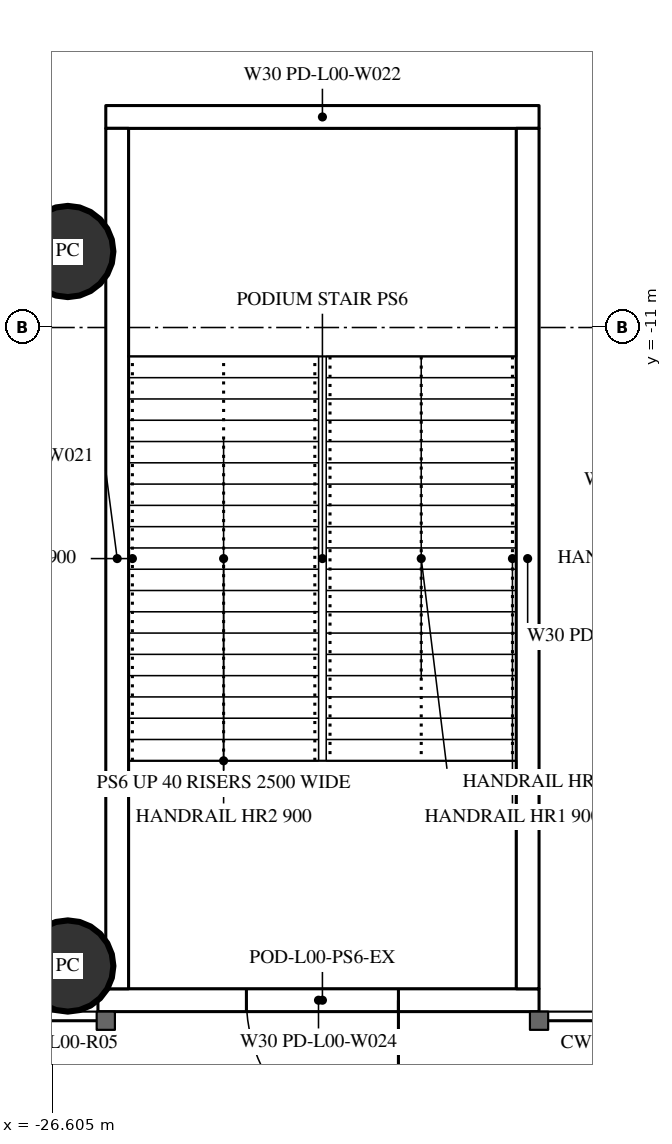
"""IFC4 building model, lengths in metres.
Left out: names, types, materials, properties, quantities, classifications, styles, units other than length and angle.
Written with IfcOpenShell. Run it as: python <this file> out.ifc"""

import sys

from ifc_helpers import new_model, si_unit, direction, frame, frame_2d, origin, origin_2d, place, context, subcontext, project, spatial, rectangle, circle, extrude, element, fill, save


model = new_model("IFC4")
c1 = context("Model", 3, precision=1e-05, world=origin(), true_north=direction((0.0, 1.0)))
c2 = subcontext(c1, "Body", "Model", "MODEL_VIEW")
j1 = project(units=[si_unit("LENGTHUNIT", "METRE"), si_unit("PLANEANGLEUNIT", "RADIAN")], contexts=[c1])
p1 = place(None, origin())
s1 = spatial("IfcSite", under=j1, at=p1, CompositionType="ELEMENT")
p2 = place(p1, origin())
s2 = spatial("IfcBuilding", under=s1, at=p2, CompositionType="ELEMENT")
p3 = place(p2, origin())
s3 = spatial("IfcBuildingStorey", under=s2, at=p3, CompositionType="ELEMENT", Elevation=0.0)
for number, where, z_axis, x_axis in (
    (1, (-26.4, -19.4, 0.0), (0.0, 0.0, 1.0), (1.0, 0.0, 0.0)),
    (2, (-26.4, -10.0, 0.0), (0.0, 0.0, 1.0), (1.0, 0.0, 0.0)),
):
    element("IfcColumn", number, at=place(p3, frame(where, z_axis=z_axis, x_axis=x_axis)), inside=s3, PredefinedType="COLUMN", context=c2, shape_type="SweptSolid", body=[
        extrude(circle(Radius=0.6, at=origin_2d()), origin(), (0.0, 0.0, 1.0), 7.2),
    ])
p4 = place(p3, frame((-20.2, -19.85, 0.0), z_axis=(0.0, 0.0, 1.0), x_axis=(-1.0, 0.0, 0.0)))
e3 = element("IfcWall", 3, at=p4, inside=s3, PredefinedType="SOLIDWALL", context=c2, shape_type="SweptSolid", body=[
    extrude(rectangle(XDim=5.803, YDim=0.3, at=frame_2d((2.902, 0.0))), origin(), (0.0, 0.0, 1.0), 5.95),
])
p5 = place(p4, frame((1.85, 0.0, 0.0)))
e4 = element("IfcOpeningElement", 4, at=p5, cuts=e3, PredefinedType="OPENING", context=c2, shape_type="SweptSolid", body=[
    extrude(rectangle(XDim=2.0, YDim=2.2, at=frame_2d((1.0, 1.1))), frame((0.0, 0.16, 0.0), z_axis=(0.0, -1.0, 0.0), x_axis=(1.0, 0.0, 0.0)), (0.0, 0.0, 1.0), 0.32),
])
p6 = place(p3, frame((-25.9, -8.23, 0.0), z_axis=(0.0, 0.0, 1.0), x_axis=(1.0, 0.0, 0.0)))
e5 = element("IfcWall", 5, at=p6, inside=s3, PredefinedType="SOLIDWALL", context=c2, shape_type="SweptSolid", body=[
    extrude(rectangle(XDim=5.7, YDim=0.3, at=frame_2d((2.85, 0.0))), origin(), (0.0, 0.0, 1.0), 6.85),
])
for number, where, z_axis, x_axis in (
    (6, (-20.35, -8.38, 0.0), (0.0, 0.0, 1.0), (0.0, -1.0, 0.0)),
    (7, (-25.75, -8.38, 0.0), (0.0, 0.0, 1.0), (0.0, -1.0, 0.0)),
):
    element("IfcWall", number, at=place(p3, frame(where, z_axis=z_axis, x_axis=x_axis)), inside=s3, PredefinedType="SOLIDWALL", context=c2, shape_type="SweptSolid", body=[
        extrude(rectangle(XDim=11.32, YDim=0.3, at=frame_2d((5.66, 0.0))), origin(), (0.0, 0.0, 1.0), 6.85),
    ])
p7 = place(p5, origin())
e8 = element("IfcDoor", 8, at=p7, inside=s3, OperationType="DOUBLE_DOOR_SINGLE_SWING", PredefinedType="DOOR", context=c2, shape_type="SweptSolid", body=[
    extrude(rectangle(XDim=2.0, YDim=2.2, at=frame_2d((1.0, 1.1))), frame((0.0, 0.025, 0.0), z_axis=(0.0, -1.0, 0.0), x_axis=(1.0, 0.0, 0.0)), (0.0, 0.0, 1.0), 0.05),
])
fill(e4, e8)
save(model, sys.argv[1])
